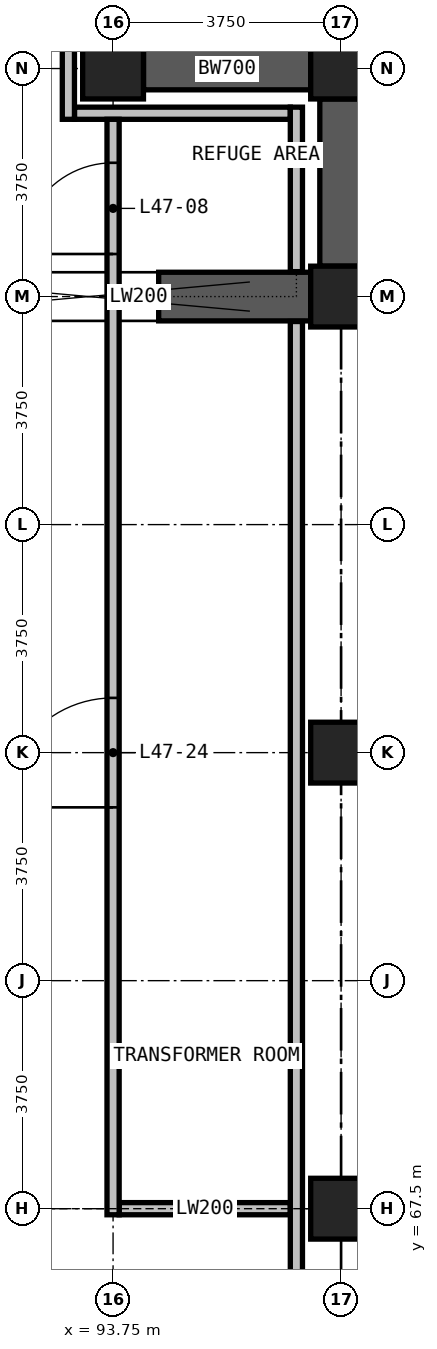
"""IFC4 building model, lengths in metres.
Left out: names, types, materials, properties, quantities, classifications, styles, units other than length and angle.
Written with IfcOpenShell. Run it as: python <this file> out.ifc"""

import sys

from ifc_helpers import new_model, si_unit, direction, frame, frame_2d, origin, origin_2d, place, context, subcontext, project, spatial, rectangle, extrude, element, fill, save


model = new_model("IFC4")
c1 = context("Model", 3, precision=1e-05, world=origin(), true_north=direction((0.0, 1.0)))
c2 = subcontext(c1, "Body", "Model", "MODEL_VIEW")
j1 = project(units=[si_unit("LENGTHUNIT", "METRE"), si_unit("PLANEANGLEUNIT", "RADIAN")], contexts=[c1])
p1 = place(None, origin())
s1 = spatial("IfcSite", under=j1, at=p1, CompositionType="ELEMENT")
p2 = place(p1, origin())
s2 = spatial("IfcBuilding", under=s1, at=p2, CompositionType="ELEMENT")
p3 = place(p2, frame((0.0, 0.0, 183.7)))
s3 = spatial("IfcBuildingStorey", under=s2, at=p3, CompositionType="ELEMENT", Elevation=183.7)
for number, where, z_axis, x_axis in (
    (1, (93.75, 86.25, 0.0), (0.0, 0.0, 1.0), (1.0, 0.0, 0.0)),
    (2, (97.5, 67.5, 0.0), (0.0, 0.0, 1.0), (1.0, 0.0, 0.0)),
    (3, (97.5, 75.0, 0.0), (0.0, 0.0, 1.0), (1.0, 0.0, 0.0)),
    (4, (97.5, 82.5, 0.0), (0.0, 0.0, 1.0), (1.0, 0.0, 0.0)),
    (5, (97.5, 86.25, 0.0), (0.0, 0.0, 1.0), (1.0, 0.0, 0.0)),
):
    element("IfcColumn", number, at=place(p3, frame(where, z_axis=z_axis, x_axis=x_axis)), inside=s3, PredefinedType="COLUMN", context=c2, shape_type="SweptSolid", body=[
        extrude(rectangle(XDim=1.0, YDim=1.0, at=origin_2d()), origin(), (0.0, 0.0, 1.0), 5.0),
    ])
for number, where, z_axis, x_axis in (
    (6, (94.25, 86.25, 0.0), (0.0, 0.0, 1.0), (1.0, 0.0, 0.0)),
    (7, (97.5, 85.75, 0.0), (0.0, 0.0, 1.0), (0.0, -1.0, 0.0)),
):
    element("IfcWall", number, at=place(p3, frame(where, z_axis=z_axis, x_axis=x_axis)), inside=s3, PredefinedType="SHEAR", context=c2, shape_type="SweptSolid", body=[
        extrude(rectangle(XDim=2.75, YDim=0.7, at=frame_2d((1.375, 0.0))), origin(), (0.0, 0.0, 1.0), 4.7),
    ])
p4 = place(p3, frame((94.5, 82.5, 0.0), z_axis=(0.0, 0.0, 1.0), x_axis=(1.0, 0.0, 0.0)))
e8 = element("IfcWall", 8, at=p4, inside=s3, PredefinedType="SHEAR", context=c2, shape_type="SweptSolid", body=[
    extrude(rectangle(XDim=2.5, YDim=0.8, at=frame_2d((1.25, 0.0))), origin(), (0.0, 0.0, 1.0), 4.7),
])
p5 = place(p3, frame((93.85, 67.5, 0.0), z_axis=(0.0, 0.0, 1.0), x_axis=(1.0, 0.0, 0.0)))
e9 = element("IfcWall", 9, at=p5, inside=s3, PredefinedType="PARTITIONING", context=c2, shape_type="SweptSolid", body=[
    extrude(rectangle(XDim=2.815, YDim=0.2, at=frame_2d((1.407, 0.0))), origin(), (0.0, 0.0, 1.0), 2.9),
])
p6 = place(p3, frame((93.85, 82.5, 0.0), z_axis=(0.0, 0.0, 1.0), x_axis=(1.0, 0.0, 0.0)))
e10 = element("IfcWall", 10, at=p6, inside=s3, PredefinedType="PARTITIONING", context=c2, shape_type="SweptSolid", body=[
    extrude(rectangle(XDim=0.64, YDim=0.2, at=frame_2d((0.32, 0.0))), origin(), (0.0, 0.0, 1.0), 2.4),
])
p7 = place(p3, frame((93.115, 85.515, 0.0), z_axis=(0.0, 0.0, 1.0), x_axis=(1.0, 0.0, 0.0)))
e11 = element("IfcWall", 11, at=p7, inside=s3, PredefinedType="PARTITIONING", context=c2, shape_type="SweptSolid", body=[
    extrude(rectangle(XDim=3.55, YDim=0.2, at=frame_2d((1.775, 0.0))), origin(), (0.0, 0.0, 1.0), 4.7),
])
p8 = place(p3, frame((93.015, 85.415, 0.0), z_axis=(0.0, 0.0, 1.0), x_axis=(0.0, 1.0, 0.0)))
e12 = element("IfcWall", 12, at=p8, inside=s3, PredefinedType="PARTITIONING", context=c2, shape_type="SweptSolid", body=[
    extrude(rectangle(XDim=3.95, YDim=0.2, at=frame_2d((1.975, 0.0))), origin(), (0.0, 0.0, 1.0), 4.7),
])
p9 = place(p3, frame((93.75, 67.4, 0.0), z_axis=(0.0, 0.0, 1.0), x_axis=(0.0, 1.0, 0.0)))
e13 = element("IfcWall", 13, at=p9, inside=s3, PredefinedType="PARTITIONING", context=c2, shape_type="SweptSolid", body=[
    extrude(rectangle(XDim=18.015, YDim=0.2, at=frame_2d((9.008, 0.0))), origin(), (0.0, 0.0, 1.0), 4.7),
])
p10 = place(p9, frame((15.8, 0.0, 0.0)))
e14 = element("IfcOpeningElement", 14, at=p10, cuts=e13, PredefinedType="OPENING", context=c2, shape_type="SweptSolid", body=[
    extrude(rectangle(XDim=1.5, YDim=2.2, at=frame_2d((0.75, 1.1))), frame((0.0, 0.11, 0.0), z_axis=(0.0, -1.0, 0.0), x_axis=(1.0, 0.0, 0.0)), (0.0, 0.0, 1.0), 0.22),
])
p11 = place(p9, frame((6.7, 0.0, 0.0)))
e15 = element("IfcOpeningElement", 15, at=p11, cuts=e13, PredefinedType="OPENING", context=c2, shape_type="SweptSolid", body=[
    extrude(rectangle(XDim=1.8, YDim=2.4, at=frame_2d((0.9, 1.2))), frame((0.0, 0.11, 0.0), z_axis=(0.0, -1.0, 0.0), x_axis=(1.0, 0.0, 0.0)), (0.0, 0.0, 1.0), 0.22),
])
p12 = place(p3, frame((96.765, 53.135, 0.0), z_axis=(0.0, 0.0, 1.0), x_axis=(0.0, 1.0, 0.0)))
e16 = element("IfcWall", 16, at=p12, inside=s3, PredefinedType="PARTITIONING", context=c2, shape_type="SweptSolid", body=[
    extrude(rectangle(XDim=28.955, YDim=0.2, at=frame_2d((14.478, 0.0))), origin(), (0.0, 0.0, 1.0), 4.7),
])
p13 = place(p3, frame((96.765, 82.91, 0.0), z_axis=(0.0, 0.0, 1.0), x_axis=(0.0, 1.0, 0.0)))
e17 = element("IfcWall", 17, at=p13, inside=s3, PredefinedType="PARTITIONING", context=c2, shape_type="SweptSolid", body=[
    extrude(rectangle(XDim=2.705, YDim=0.2, at=frame_2d((1.353, 0.0))), origin(), (0.0, 0.0, 1.0), 4.7),
])
p14 = place(p10, origin())
e18 = element("IfcDoor", 18, at=p14, inside=s3, OperationType="DOUBLE_DOOR_SINGLE_SWING", PredefinedType="DOOR", context=c2, shape_type="SweptSolid", body=[
    extrude(rectangle(XDim=1.5, YDim=2.2, at=frame_2d((0.75, 1.1))), frame((0.0, 0.025, 0.0), z_axis=(0.0, -1.0, 0.0), x_axis=(1.0, 0.0, 0.0)), (0.0, 0.0, 1.0), 0.05),
])
fill(e14, e18)
p15 = place(p11, origin())
e19 = element("IfcDoor", 19, at=p15, inside=s3, OperationType="DOUBLE_DOOR_SINGLE_SWING", PredefinedType="DOOR", context=c2, shape_type="SweptSolid", body=[
    extrude(rectangle(XDim=1.8, YDim=2.4, at=frame_2d((0.9, 1.2))), frame((0.0, 0.025, 0.0), z_axis=(0.0, -1.0, 0.0), x_axis=(1.0, 0.0, 0.0)), (0.0, 0.0, 1.0), 0.05),
])
fill(e15, e19)
save(model, sys.argv[1])
